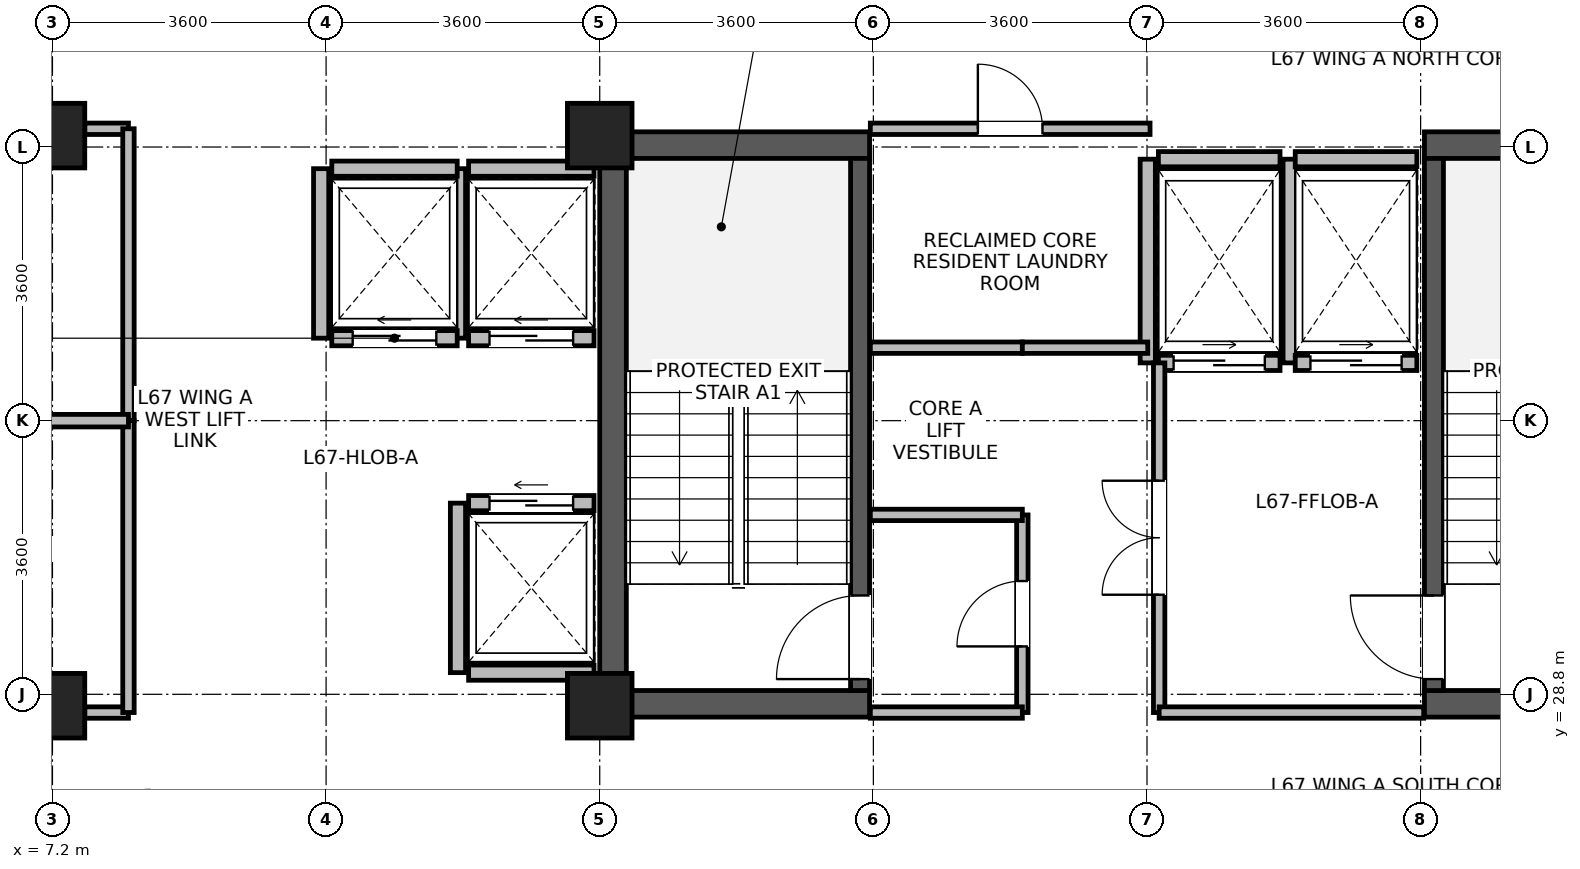
"""IFC4 building model, lengths in metres.
Left out: names, types, materials, properties, quantities, classifications, styles, units other than length and angle.
Written with IfcOpenShell. Run it as: python <this file> out.ifc"""

import sys

from ifc_helpers import new_model, si_unit, direction, frame, frame_2d, origin, origin_2d, place, context, subcontext, project, spatial, rectangle, extrude, source, transform, mapped, element, fill, save


model = new_model("IFC4")
c1 = context("Model", 3, precision=1e-05, world=origin(), true_north=direction((0.0, 1.0)))
c2 = subcontext(c1, "Body", "Model", "MODEL_VIEW")
j1 = project(units=[si_unit("LENGTHUNIT", "METRE"), si_unit("PLANEANGLEUNIT", "RADIAN")], contexts=[c1])
p1 = place(None, origin())
s1 = spatial("IfcSite", under=j1, at=p1, CompositionType="ELEMENT")
p2 = place(p1, origin())
s2 = spatial("IfcBuilding", under=s1, at=p2, CompositionType="ELEMENT")
p3 = place(p2, frame((0.0, 0.0, 261.0)))
s3 = spatial("IfcBuildingStorey", under=s2, at=p3, CompositionType="ELEMENT", Elevation=261.0)
p4 = place(p3, frame((14.575, 28.5, 0.0), z_axis=(0.0, 0.0, 1.0), x_axis=(0.0, 1.0, 0.0)))
e1 = element("IfcWall", 1, at=p4, inside=s3, PredefinedType="SHEAR", context=c2, shape_type="SweptSolid", body=[
    extrude(rectangle(XDim=7.7, YDim=0.35, at=frame_2d((3.85, 0.0))), origin(), (0.0, 0.0, 1.0), 3.475),
])
for number, where, z_axis, x_axis in (
    (2, (14.75, 28.675, 0.0), (0.0, 0.0, 1.0), (1.0, 0.0, 0.0)),
    (3, (25.25, 28.675, 0.0), (0.0, 0.0, 1.0), (1.0, 0.0, 0.0)),
    (4, (14.75, 36.025, 0.0), (0.0, 0.0, 1.0), (1.0, 0.0, 0.0)),
    (5, (25.25, 36.025, 0.0), (0.0, 0.0, 1.0), (1.0, 0.0, 0.0)),
):
    element("IfcWall", number, at=place(p3, frame(where, z_axis=z_axis, x_axis=x_axis)), inside=s3, PredefinedType="SHEAR", context=c2, shape_type="SweptSolid", body=[
        extrude(rectangle(XDim=3.2, YDim=0.35, at=frame_2d((1.6, 0.0))), origin(), (0.0, 0.0, 1.0), 3.475),
    ])
p5 = place(p3, frame((17.825, 28.85, 0.0), z_axis=(0.0, 0.0, 1.0), x_axis=(0.0, 1.0, 0.0)))
e6 = element("IfcWall", 6, at=p5, inside=s3, PredefinedType="SHEAR", context=c2, shape_type="SweptSolid", body=[
    extrude(rectangle(XDim=7.0, YDim=0.25, at=frame_2d((3.5, 0.0))), origin(), (0.0, 0.0, 1.0), 3.475),
])
p6 = place(p5, frame((0.15, 0.0, 0.0)))
e7 = element("IfcOpeningElement", 7, at=p6, cuts=e6, PredefinedType="OPENING", context=c2, shape_type="SweptSolid", body=[
    extrude(rectangle(XDim=1.1, YDim=2.08, at=frame_2d((0.55, 1.04))), frame((0.0, 0.135, 0.0), z_axis=(0.0, -1.0, 0.0), x_axis=(1.0, 0.0, 0.0)), (0.0, 0.0, 1.0), 0.27),
])
p7 = place(p3, frame((25.375, 28.85, 0.0), z_axis=(0.0, 0.0, 1.0), x_axis=(0.0, 1.0, 0.0)))
e8 = element("IfcWall", 8, at=p7, inside=s3, PredefinedType="SHEAR", context=c2, shape_type="SweptSolid", body=[
    extrude(rectangle(XDim=7.0, YDim=0.25, at=frame_2d((3.5, 0.0))), origin(), (0.0, 0.0, 1.0), 3.475),
])
p8 = place(p7, frame((0.15, 0.0, 0.0)))
e9 = element("IfcOpeningElement", 9, at=p8, cuts=e8, PredefinedType="OPENING", context=c2, shape_type="SweptSolid", body=[
    extrude(rectangle(XDim=1.1, YDim=2.08, at=frame_2d((0.55, 1.04))), frame((0.0, 0.135, 0.0), z_axis=(0.0, -1.0, 0.0), x_axis=(1.0, 0.0, 0.0)), (0.0, 0.0, 1.0), 0.27),
])
m1 = source(origin(), c2, "Body", "SweptSolid", [
    extrude(rectangle(XDim=0.85, YDim=0.85, at=origin_2d()), origin(), (0.0, 0.0, 1.0), 3.7),
])
for number, where, z_axis, x_axis in (
    (10, (7.2, 28.65, 0.0), (0.0, 0.0, 1.0), (1.0, 0.0, 0.0)),
    (11, (7.2, 36.15, 0.0), (0.0, 0.0, 1.0), (1.0, 0.0, 0.0)),
    (12, (14.4, 28.65, 0.0), (0.0, 0.0, 1.0), (1.0, 0.0, 0.0)),
    (13, (14.4, 36.15, 0.0), (0.0, 0.0, 1.0), (1.0, 0.0, 0.0)),
):
    element("IfcColumn", number, at=place(p3, frame(where, z_axis=z_axis, x_axis=x_axis)), inside=s3, PredefinedType="COLUMN", context=c2, shape_type="MappedRepresentation", body=[
        mapped(m1, transform((0.0, 0.0, 0.0), x_axis=(1.0, 0.0, 0.0), y_axis=(0.0, 1.0, 0.0), z_axis=(0.0, 0.0, 1.0), scale=1.0)),
    ])
p9 = place(p3, frame((12.675, 33.485, 0.0), z_axis=(0.0, 0.0, 1.0), x_axis=(1.0, 0.0, 0.0)))
e14 = element("IfcWall", 14, at=p9, inside=s3, PredefinedType="PARTITIONING", context=c2, shape_type="SweptSolid", body=[
    extrude(rectangle(XDim=1.65, YDim=0.2, at=frame_2d((0.825, 0.0))), origin(), (0.0, 0.0, 1.0), 3.455),
])
p10 = place(p9, frame((0.275, 0.0, 0.0)))
e15 = element("IfcOpeningElement", 15, at=p10, cuts=e14, PredefinedType="OPENING", context=c2, shape_type="SweptSolid", body=[
    extrude(rectangle(XDim=1.1, YDim=2.12, at=frame_2d((0.55, 1.06))), frame((0.0, 0.11, 0.0), z_axis=(0.0, -1.0, 0.0), x_axis=(1.0, 0.0, 0.0)), (0.0, 0.0, 1.0), 0.22),
])
p11 = place(p3, frame((12.675, 35.715, 0.0), z_axis=(0.0, 0.0, 1.0), x_axis=(1.0, 0.0, 0.0)))
e16 = element("IfcWall", 16, at=p11, inside=s3, PredefinedType="PARTITIONING", context=c2, shape_type="SweptSolid", body=[
    extrude(rectangle(XDim=1.65, YDim=0.2, at=frame_2d((0.825, 0.0))), origin(), (0.0, 0.0, 1.0), 3.455),
])
p12 = place(p3, frame((12.535, 33.485, 0.0), z_axis=(0.0, 0.0, 1.0), x_axis=(0.0, 1.0, 0.0)))
e17 = element("IfcWall", 17, at=p12, inside=s3, PredefinedType="PARTITIONING", context=c2, shape_type="SweptSolid", body=[
    extrude(rectangle(XDim=2.23, YDim=0.2, at=frame_2d((1.115, 0.0))), origin(), (0.0, 0.0, 1.0), 3.455),
])
p13 = place(p3, frame((12.675, 29.085, 0.0), z_axis=(0.0, 0.0, 1.0), x_axis=(1.0, 0.0, 0.0)))
e18 = element("IfcWall", 18, at=p13, inside=s3, PredefinedType="PARTITIONING", context=c2, shape_type="SweptSolid", body=[
    extrude(rectangle(XDim=1.65, YDim=0.2, at=frame_2d((0.825, 0.0))), origin(), (0.0, 0.0, 1.0), 3.455),
])
p14 = place(p3, frame((12.675, 31.315, 0.0), z_axis=(0.0, 0.0, 1.0), x_axis=(1.0, 0.0, 0.0)))
e19 = element("IfcWall", 19, at=p14, inside=s3, PredefinedType="PARTITIONING", context=c2, shape_type="SweptSolid", body=[
    extrude(rectangle(XDim=1.65, YDim=0.2, at=frame_2d((0.825, 0.0))), origin(), (0.0, 0.0, 1.0), 3.455),
])
p15 = place(p14, frame((0.275, 0.0, 0.0)))
e20 = element("IfcOpeningElement", 20, at=p15, cuts=e19, PredefinedType="OPENING", context=c2, shape_type="SweptSolid", body=[
    extrude(rectangle(XDim=1.1, YDim=2.12, at=frame_2d((0.55, 1.06))), frame((0.0, 0.11, 0.0), z_axis=(0.0, -1.0, 0.0), x_axis=(1.0, 0.0, 0.0)), (0.0, 0.0, 1.0), 0.22),
])
p16 = place(p3, frame((12.535, 29.085, 0.0), z_axis=(0.0, 0.0, 1.0), x_axis=(0.0, 1.0, 0.0)))
e21 = element("IfcWall", 21, at=p16, inside=s3, PredefinedType="PARTITIONING", context=c2, shape_type="SweptSolid", body=[
    extrude(rectangle(XDim=2.23, YDim=0.2, at=frame_2d((1.115, 0.0))), origin(), (0.0, 0.0, 1.0), 3.455),
])
p17 = place(p3, frame((10.875, 33.485, 0.0), z_axis=(0.0, 0.0, 1.0), x_axis=(1.0, 0.0, 0.0)))
e22 = element("IfcWall", 22, at=p17, inside=s3, PredefinedType="PARTITIONING", context=c2, shape_type="SweptSolid", body=[
    extrude(rectangle(XDim=1.65, YDim=0.2, at=frame_2d((0.825, 0.0))), origin(), (0.0, 0.0, 1.0), 3.455),
])
p18 = place(p17, frame((0.275, 0.0, 0.0)))
e23 = element("IfcOpeningElement", 23, at=p18, cuts=e22, PredefinedType="OPENING", context=c2, shape_type="SweptSolid", body=[
    extrude(rectangle(XDim=1.1, YDim=2.12, at=frame_2d((0.55, 1.06))), frame((0.0, 0.11, 0.0), z_axis=(0.0, -1.0, 0.0), x_axis=(1.0, 0.0, 0.0)), (0.0, 0.0, 1.0), 0.22),
])
p19 = place(p3, frame((10.875, 35.715, 0.0), z_axis=(0.0, 0.0, 1.0), x_axis=(1.0, 0.0, 0.0)))
e24 = element("IfcWall", 24, at=p19, inside=s3, PredefinedType="PARTITIONING", context=c2, shape_type="SweptSolid", body=[
    extrude(rectangle(XDim=1.65, YDim=0.2, at=frame_2d((0.825, 0.0))), origin(), (0.0, 0.0, 1.0), 3.455),
])
p20 = place(p3, frame((10.735, 33.485, 0.0), z_axis=(0.0, 0.0, 1.0), x_axis=(0.0, 1.0, 0.0)))
e25 = element("IfcWall", 25, at=p20, inside=s3, PredefinedType="PARTITIONING", context=c2, shape_type="SweptSolid", body=[
    extrude(rectangle(XDim=2.23, YDim=0.2, at=frame_2d((1.115, 0.0))), origin(), (0.0, 0.0, 1.0), 3.455),
])
p21 = place(p3, frame((21.75, 33.16, 0.0), z_axis=(0.0, 0.0, 1.0), x_axis=(1.0, 0.0, 0.0)))
e26 = element("IfcWall", 26, at=p21, inside=s3, PredefinedType="PARTITIONING", context=c2, shape_type="SweptSolid", body=[
    extrude(rectangle(XDim=1.6, YDim=0.2, at=frame_2d((0.8, 0.0))), origin(), (0.0, 0.0, 1.0), 3.455),
])
p22 = place(p21, frame((0.2, 0.0, 0.0)))
e27 = element("IfcOpeningElement", 27, at=p22, cuts=e26, PredefinedType="OPENING", context=c2, shape_type="SweptSolid", body=[
    extrude(rectangle(XDim=1.2, YDim=2.12, at=frame_2d((0.6, 1.06))), frame((0.0, 0.11, 0.0), z_axis=(0.0, -1.0, 0.0), x_axis=(1.0, 0.0, 0.0)), (0.0, 0.0, 1.0), 0.22),
])
p23 = place(p3, frame((21.75, 35.84, 0.0), z_axis=(0.0, 0.0, 1.0), x_axis=(1.0, 0.0, 0.0)))
e28 = element("IfcWall", 28, at=p23, inside=s3, PredefinedType="PARTITIONING", context=c2, shape_type="SweptSolid", body=[
    extrude(rectangle(XDim=1.6, YDim=0.2, at=frame_2d((0.8, 0.0))), origin(), (0.0, 0.0, 1.0), 2.555),
])
for number, where, z_axis, x_axis in (
    (29, (21.61, 33.16, 0.0), (0.0, 0.0, 1.0), (0.0, 1.0, 0.0)),
    (30, (23.49, 33.16, 0.0), (0.0, 0.0, 1.0), (0.0, 1.0, 0.0)),
):
    element("IfcWall", number, at=place(p3, frame(where, z_axis=z_axis, x_axis=x_axis)), inside=s3, PredefinedType="PARTITIONING", context=c2, shape_type="SweptSolid", body=[
        extrude(rectangle(XDim=2.68, YDim=0.2, at=frame_2d((1.34, 0.0))), origin(), (0.0, 0.0, 1.0), 3.455),
    ])
p24 = place(p3, frame((23.55, 33.16, 0.0), z_axis=(0.0, 0.0, 1.0), x_axis=(1.0, 0.0, 0.0)))
e31 = element("IfcWall", 31, at=p24, inside=s3, PredefinedType="PARTITIONING", context=c2, shape_type="SweptSolid", body=[
    extrude(rectangle(XDim=1.6, YDim=0.2, at=frame_2d((0.8, 0.0))), origin(), (0.0, 0.0, 1.0), 3.455),
])
p25 = place(p24, frame((0.2, 0.0, 0.0)))
e32 = element("IfcOpeningElement", 32, at=p25, cuts=e31, PredefinedType="OPENING", context=c2, shape_type="SweptSolid", body=[
    extrude(rectangle(XDim=1.2, YDim=2.12, at=frame_2d((0.6, 1.06))), frame((0.0, 0.11, 0.0), z_axis=(0.0, -1.0, 0.0), x_axis=(1.0, 0.0, 0.0)), (0.0, 0.0, 1.0), 0.22),
])
p26 = place(p3, frame((23.55, 35.84, 0.0), z_axis=(0.0, 0.0, 1.0), x_axis=(1.0, 0.0, 0.0)))
e33 = element("IfcWall", 33, at=p26, inside=s3, PredefinedType="PARTITIONING", context=c2, shape_type="SweptSolid", body=[
    extrude(rectangle(XDim=1.6, YDim=0.2, at=frame_2d((0.8, 0.0))), origin(), (0.0, 0.0, 1.0), 2.555),
])
for number, where, z_axis, x_axis in (
    (34, (7.625, 28.56, 0.0), (0.0, 0.0, 1.0), (1.0, 0.0, 0.0)),
    (35, (7.625, 36.24, 0.0), (0.0, 0.0, 1.0), (1.0, 0.0, 0.0)),
):
    element("IfcWall", number, at=place(p3, frame(where, z_axis=z_axis, x_axis=x_axis)), inside=s3, PredefinedType="PARTITIONING", context=c2, shape_type="SweptSolid", body=[
        extrude(rectangle(XDim=0.575, YDim=0.15, at=frame_2d((0.288, 0.0))), origin(), (0.0, 0.0, 1.0), 2.905),
    ])
p27 = place(p3, frame((8.2, 32.4, 0.0), z_axis=(0.0, 0.0, 1.0), x_axis=(0.0, 1.0, 0.0)))
e36 = element("IfcWall", 36, at=p27, inside=s3, PredefinedType="PARTITIONING", context=c2, shape_type="SweptSolid", body=[
    extrude(rectangle(XDim=3.84, YDim=0.15, at=frame_2d((1.92, 0.0))), origin(), (0.0, 0.0, 1.0), 3.455),
])
p28 = place(p3, frame((8.2, 28.56, 0.0), z_axis=(0.0, 0.0, 1.0), x_axis=(0.0, 1.0, 0.0)))
e37 = element("IfcWall", 37, at=p28, inside=s3, PredefinedType="PARTITIONING", context=c2, shape_type="SweptSolid", body=[
    extrude(rectangle(XDim=3.84, YDim=0.15, at=frame_2d((1.92, 0.0))), origin(), (0.0, 0.0, 1.0), 3.455),
])
p29 = place(p3, frame((17.96, 36.24, 0.0), z_axis=(0.0, 0.0, 1.0), x_axis=(1.0, 0.0, 0.0)))
e38 = element("IfcWall", 38, at=p29, inside=s3, PredefinedType="PARTITIONING", context=c2, shape_type="SweptSolid", body=[
    extrude(rectangle(XDim=3.68, YDim=0.15, at=frame_2d((1.84, 0.0))), origin(), (0.0, 0.0, 1.0), 2.555),
])
p30 = place(p29, frame((1.415, 0.0, 0.0)))
e39 = element("IfcOpeningElement", 39, at=p30, cuts=e38, PredefinedType="OPENING", context=c2, shape_type="SweptSolid", body=[
    extrude(rectangle(XDim=0.85, YDim=2.04, at=frame_2d((0.425, 1.02))), frame((0.0, 0.085, 0.0), z_axis=(0.0, -1.0, 0.0), x_axis=(1.0, 0.0, 0.0)), (0.0, 0.0, 1.0), 0.17),
])
p31 = place(p3, frame((19.96, 28.56, 0.0), z_axis=(0.0, 0.0, 1.0), x_axis=(0.0, 1.0, 0.0)))
e40 = element("IfcWall", 40, at=p31, inside=s3, PredefinedType="PARTITIONING", context=c2, shape_type="SweptSolid", body=[
    extrude(rectangle(XDim=2.6, YDim=0.15, at=frame_2d((1.3, 0.0))), origin(), (0.0, 0.0, 1.0), 3.455),
])
p32 = place(p31, frame((0.87, 0.0, 0.0)))
e41 = element("IfcOpeningElement", 41, at=p32, cuts=e40, PredefinedType="OPENING", context=c2, shape_type="SweptSolid", body=[
    extrude(rectangle(XDim=0.86, YDim=2.02, at=frame_2d((0.43, 1.01))), frame((0.0, 0.085, 0.0), z_axis=(0.0, -1.0, 0.0), x_axis=(1.0, 0.0, 0.0)), (0.0, 0.0, 1.0), 0.17),
])
p33 = place(p3, frame((17.96, 28.56, 0.0), z_axis=(0.0, 0.0, 1.0), x_axis=(1.0, 0.0, 0.0)))
e42 = element("IfcWall", 42, at=p33, inside=s3, PredefinedType="PARTITIONING", context=c2, shape_type="SweptSolid", body=[
    extrude(rectangle(XDim=2.0, YDim=0.15, at=frame_2d((1.0, 0.0))), origin(), (0.0, 0.0, 1.0), 2.555),
])
for number, where, z_axis, x_axis in (
    (43, (17.96, 31.16, 0.0), (0.0, 0.0, 1.0), (1.0, 0.0, 0.0)),
    (44, (17.96, 33.36, 0.0), (0.0, 0.0, 1.0), (1.0, 0.0, 0.0)),
):
    element("IfcWall", number, at=place(p3, frame(where, z_axis=z_axis, x_axis=x_axis)), inside=s3, PredefinedType="PARTITIONING", context=c2, shape_type="SweptSolid", body=[
        extrude(rectangle(XDim=2.0, YDim=0.15, at=frame_2d((1.0, 0.0))), origin(), (0.0, 0.0, 1.0), 3.455),
    ])
p34 = place(p3, frame((19.96, 33.36, 0.0), z_axis=(0.0, 0.0, 1.0), x_axis=(1.0, 0.0, 0.0)))
e45 = element("IfcWall", 45, at=p34, inside=s3, PredefinedType="PARTITIONING", context=c2, shape_type="SweptSolid", body=[
    extrude(rectangle(XDim=1.65, YDim=0.15, at=frame_2d((0.825, 0.0))), origin(), (0.0, 0.0, 1.0), 3.455),
])
p35 = place(p3, frame((3.732, 32.4, 0.0), z_axis=(0.0, 0.0, 1.0), x_axis=(1.0, 0.0, 0.0)))
e46 = element("IfcWall", 46, at=p35, inside=s3, PredefinedType="PARTITIONING", context=c2, shape_type="SweptSolid", body=[
    extrude(rectangle(XDim=4.468, YDim=0.165, at=frame_2d((2.234, 0.0))), origin(), (0.0, 0.0, 1.0), 3.455),
])
p36 = place(p3, frame((21.76, 28.56, 0.0), z_axis=(0.0, 0.0, 1.0), x_axis=(0.0, 1.0, 0.0)))
e47 = element("IfcWall", 47, at=p36, inside=s3, PredefinedType="PARTITIONING", context=c2, shape_type="SweptSolid", body=[
    extrude(rectangle(XDim=4.6, YDim=0.15, at=frame_2d((2.3, 0.0))), origin(), (0.0, 0.0, 1.0), 3.455),
])
p37 = place(p36, frame((1.55, 0.0, 0.0)))
e48 = element("IfcOpeningElement", 48, at=p37, cuts=e47, PredefinedType="OPENING", context=c2, shape_type="SweptSolid", body=[
    extrude(rectangle(XDim=1.5, YDim=2.1, at=frame_2d((0.75, 1.05))), frame((0.0, 0.085, 0.0), z_axis=(0.0, -1.0, 0.0), x_axis=(1.0, 0.0, 0.0)), (0.0, 0.0, 1.0), 0.17),
])
p38 = place(p3, frame((21.76, 28.56, 0.0), z_axis=(0.0, 0.0, 1.0), x_axis=(1.0, 0.0, 0.0)))
e49 = element("IfcWall", 49, at=p38, inside=s3, PredefinedType="PARTITIONING", context=c2, shape_type="SweptSolid", body=[
    extrude(rectangle(XDim=3.48, YDim=0.15, at=frame_2d((1.74, 0.0))), origin(), (0.0, 0.0, 1.0), 2.555),
])
p39 = place(p6, origin())
e50 = element("IfcDoor", 50, at=p39, inside=s3, OperationType="SINGLE_SWING_LEFT", PredefinedType="DOOR", context=c2, shape_type="SweptSolid", body=[
    extrude(rectangle(XDim=1.1, YDim=2.08, at=frame_2d((0.55, 1.04))), frame((0.0, 0.025, 0.0), z_axis=(0.0, -1.0, 0.0), x_axis=(1.0, 0.0, 0.0)), (0.0, 0.0, 1.0), 0.05),
])
fill(e7, e50)
p40 = place(p8, origin())
e51 = element("IfcDoor", 51, at=p40, inside=s3, OperationType="SINGLE_SWING_RIGHT", PredefinedType="DOOR", context=c2, shape_type="SweptSolid", body=[
    extrude(rectangle(XDim=1.1, YDim=2.08, at=frame_2d((0.55, 1.04))), frame((0.0, 0.025, 0.0), z_axis=(0.0, -1.0, 0.0), x_axis=(1.0, 0.0, 0.0)), (0.0, 0.0, 1.0), 0.05),
])
fill(e9, e51)
p41 = place(p10, origin())
e52 = element("IfcDoor", 52, at=p41, inside=s3, OperationType="SLIDING_TO_LEFT", PredefinedType="DOOR", context=c2, shape_type="SweptSolid", body=[
    extrude(rectangle(XDim=1.1, YDim=2.12, at=frame_2d((0.55, 1.06))), frame((0.0, 0.025, 0.0), z_axis=(0.0, -1.0, 0.0), x_axis=(1.0, 0.0, 0.0)), (0.0, 0.0, 1.0), 0.05),
])
fill(e15, e52)
p42 = place(p15, origin())
e53 = element("IfcDoor", 53, at=p42, inside=s3, OperationType="SLIDING_TO_LEFT", PredefinedType="DOOR", context=c2, shape_type="SweptSolid", body=[
    extrude(rectangle(XDim=1.1, YDim=2.12, at=frame_2d((0.55, 1.06))), frame((0.0, 0.025, 0.0), z_axis=(0.0, -1.0, 0.0), x_axis=(1.0, 0.0, 0.0)), (0.0, 0.0, 1.0), 0.05),
])
fill(e20, e53)
p43 = place(p18, origin())
e54 = element("IfcDoor", 54, at=p43, inside=s3, OperationType="SLIDING_TO_LEFT", PredefinedType="DOOR", context=c2, shape_type="SweptSolid", body=[
    extrude(rectangle(XDim=1.1, YDim=2.12, at=frame_2d((0.55, 1.06))), frame((0.0, 0.025, 0.0), z_axis=(0.0, -1.0, 0.0), x_axis=(1.0, 0.0, 0.0)), (0.0, 0.0, 1.0), 0.05),
])
fill(e23, e54)
p44 = place(p22, origin())
e55 = element("IfcDoor", 55, at=p44, inside=s3, OperationType="SLIDING_TO_RIGHT", PredefinedType="DOOR", context=c2, shape_type="SweptSolid", body=[
    extrude(rectangle(XDim=1.2, YDim=2.12, at=frame_2d((0.6, 1.06))), frame((0.0, 0.025, 0.0), z_axis=(0.0, -1.0, 0.0), x_axis=(1.0, 0.0, 0.0)), (0.0, 0.0, 1.0), 0.05),
])
fill(e27, e55)
p45 = place(p25, origin())
e56 = element("IfcDoor", 56, at=p45, inside=s3, OperationType="SLIDING_TO_RIGHT", PredefinedType="DOOR", context=c2, shape_type="SweptSolid", body=[
    extrude(rectangle(XDim=1.2, YDim=2.12, at=frame_2d((0.6, 1.06))), frame((0.0, 0.025, 0.0), z_axis=(0.0, -1.0, 0.0), x_axis=(1.0, 0.0, 0.0)), (0.0, 0.0, 1.0), 0.05),
])
fill(e32, e56)
p46 = place(p30, origin())
e57 = element("IfcDoor", 57, at=p46, inside=s3, OperationType="SINGLE_SWING_LEFT", PredefinedType="DOOR", context=c2, shape_type="SweptSolid", body=[
    extrude(rectangle(XDim=0.85, YDim=2.04, at=frame_2d((0.425, 1.02))), frame((0.0, 0.025, 0.0), z_axis=(0.0, -1.0, 0.0), x_axis=(1.0, 0.0, 0.0)), (0.0, 0.0, 1.0), 0.05),
])
fill(e39, e57)
p47 = place(p32, origin())
e58 = element("IfcDoor", 58, at=p47, inside=s3, OperationType="SINGLE_SWING_LEFT", PredefinedType="DOOR", context=c2, shape_type="SweptSolid", body=[
    extrude(rectangle(XDim=0.86, YDim=2.02, at=frame_2d((0.43, 1.01))), frame((0.0, 0.025, 0.0), z_axis=(0.0, -1.0, 0.0), x_axis=(1.0, 0.0, 0.0)), (0.0, 0.0, 1.0), 0.05),
])
fill(e41, e58)
p48 = place(p37, origin())
e59 = element("IfcDoor", 59, at=p48, inside=s3, OperationType="DOUBLE_DOOR_SINGLE_SWING", PredefinedType="DOOR", context=c2, shape_type="SweptSolid", body=[
    extrude(rectangle(XDim=1.5, YDim=2.1, at=frame_2d((0.75, 1.05))), frame((0.0, 0.025, 0.0), z_axis=(0.0, -1.0, 0.0), x_axis=(1.0, 0.0, 0.0)), (0.0, 0.0, 1.0), 0.05),
])
fill(e48, e59)
save(model, sys.argv[1])
